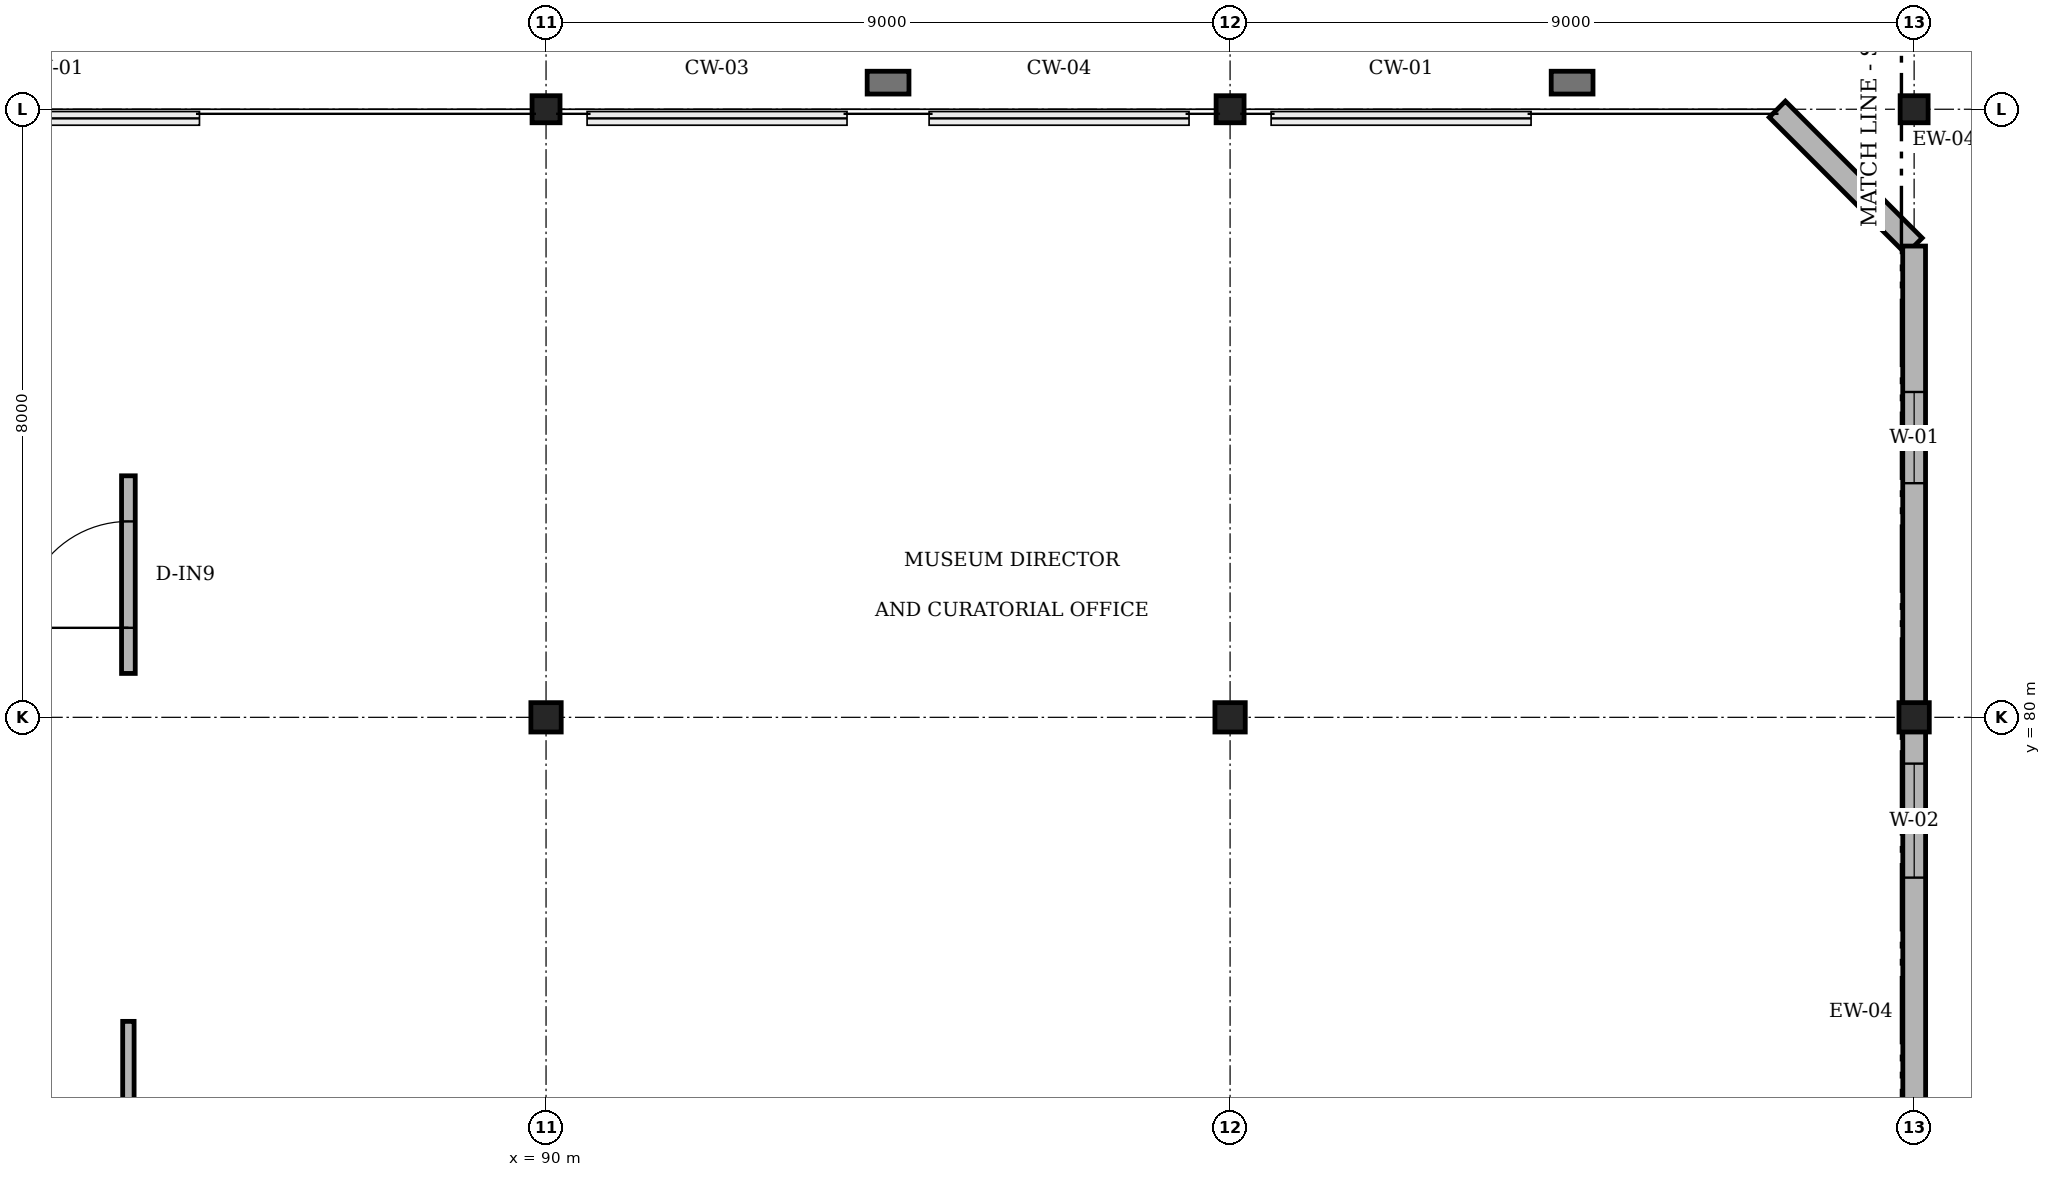
"""IFC4 building model, lengths in metres.
Left out: names, types, materials, properties, quantities, classifications, styles, units other than length and angle.
Written with IfcOpenShell. Run it as: python <this file> out.ifc"""

import sys

from ifc_helpers import new_model, si_unit, direction, frame, frame_2d, origin, origin_2d, place, context, subcontext, project, spatial, rectangle, i_section, extrude, element, fill, save


model = new_model("IFC4")
c1 = context("Model", 3, precision=1e-05, world=origin(), true_north=direction((0.0, 1.0)))
c2 = subcontext(c1, "Body", "Model", "MODEL_VIEW")
j1 = project(units=[si_unit("LENGTHUNIT", "METRE"), si_unit("PLANEANGLEUNIT", "RADIAN")], contexts=[c1])
p1 = place(None, origin())
s1 = spatial("IfcSite", under=j1, at=p1, CompositionType="ELEMENT")
p2 = place(p1, origin())
s2 = spatial("IfcBuilding", under=s1, at=p2, CompositionType="ELEMENT")
p3 = place(p2, frame((0.0, 0.0, 15.6)))
s3 = spatial("IfcBuildingStorey", under=s2, at=p3, CompositionType="ELEMENT", Elevation=15.6)
p4 = place(p3, frame((90.0, 80.0, 0.0), z_axis=(0.0, 0.0, 1.0), x_axis=(1.0, 0.0, 0.0)))
e1 = element("IfcColumn", 1, at=p4, inside=s3, PredefinedType="COLUMN", context=c2, shape_type="SweptSolid", body=[
    extrude(i_section(OverallWidth=0.399, OverallDepth=0.386, WebThickness=0.021, FlangeThickness=0.033, FilletRadius=0.015, at=origin_2d()), origin(), (0.0, 0.0, 1.0), 4.8),
])
p5 = place(p3, frame((90.0, 88.0, 0.0), z_axis=(0.0, 0.0, 1.0), x_axis=(1.0, 0.0, 0.0)))
e2 = element("IfcColumn", 2, at=p5, inside=s3, PredefinedType="COLUMN", context=c2, shape_type="SweptSolid", body=[
    extrude(i_section(OverallWidth=0.368, OverallDepth=0.356, WebThickness=0.011, FlangeThickness=0.018, FilletRadius=0.015, at=origin_2d()), origin(), (0.0, 0.0, 1.0), 4.8),
])
p6 = place(p3, frame((99.0, 80.0, 0.0), z_axis=(0.0, 0.0, 1.0), x_axis=(1.0, 0.0, 0.0)))
e3 = element("IfcColumn", 3, at=p6, inside=s3, PredefinedType="COLUMN", context=c2, shape_type="SweptSolid", body=[
    extrude(i_section(OverallWidth=0.399, OverallDepth=0.386, WebThickness=0.021, FlangeThickness=0.033, FilletRadius=0.015, at=origin_2d()), origin(), (0.0, 0.0, 1.0), 4.8),
])
p7 = place(p3, frame((99.0, 88.0, 0.0), z_axis=(0.0, 0.0, 1.0), x_axis=(1.0, 0.0, 0.0)))
e4 = element("IfcColumn", 4, at=p7, inside=s3, PredefinedType="COLUMN", context=c2, shape_type="SweptSolid", body=[
    extrude(i_section(OverallWidth=0.368, OverallDepth=0.356, WebThickness=0.011, FlangeThickness=0.018, FilletRadius=0.015, at=origin_2d()), origin(), (0.0, 0.0, 1.0), 4.8),
])
p8 = place(p3, frame((108.0, 80.0, 0.0), z_axis=(0.0, 0.0, 1.0), x_axis=(1.0, 0.0, 0.0)))
e5 = element("IfcColumn", 5, at=p8, inside=s3, PredefinedType="COLUMN", context=c2, shape_type="SweptSolid", body=[
    extrude(i_section(OverallWidth=0.399, OverallDepth=0.386, WebThickness=0.021, FlangeThickness=0.033, FilletRadius=0.015, at=origin_2d()), origin(), (0.0, 0.0, 1.0), 4.8),
])
p9 = place(p3, frame((108.0, 88.0, 0.0), z_axis=(0.0, 0.0, 1.0), x_axis=(1.0, 0.0, 0.0)))
e6 = element("IfcColumn", 6, at=p9, inside=s3, PredefinedType="COLUMN", context=c2, shape_type="SweptSolid", body=[
    extrude(i_section(OverallWidth=0.368, OverallDepth=0.356, WebThickness=0.011, FlangeThickness=0.018, FilletRadius=0.015, at=origin_2d()), origin(), (0.0, 0.0, 1.0), 4.8),
])
for number, where, z_axis, x_axis in (
    (7, (94.5, 88.35, 0.0), (0.0, 0.0, 1.0), (1.0, 0.0, 0.0)),
    (8, (103.5, 88.35, 0.0), (0.0, 0.0, 1.0), (1.0, 0.0, 0.0)),
):
    element("IfcColumn", number, at=place(p3, frame(where, z_axis=z_axis, x_axis=x_axis)), inside=s3, PredefinedType="PILASTER", context=c2, shape_type="SweptSolid", body=[
        extrude(rectangle(XDim=0.55, YDim=0.3, at=origin_2d()), origin(), (0.0, 0.0, 1.0), 4.8),
    ])
p10 = place(p3, frame((106.2, 88.0, 0.0), z_axis=(0.0, 0.0, 1.0), x_axis=(0.707106781187, -0.707106781187, 0.0)))
e9 = element("IfcWall", 9, at=p10, inside=s3, PredefinedType="SOLIDWALL", context=c2, shape_type="SweptSolid", body=[
    extrude(rectangle(XDim=2.546, YDim=0.3, at=frame_2d((1.273, 0.0))), origin(), (0.0, 0.0, 1.0), 3.832),
])
p11 = place(p3, frame((108.0, 86.2, 0.0), z_axis=(0.0, 0.0, 1.0), x_axis=(0.000133228364, -0.999999991125, 0.0)))
e10 = element("IfcWall", 10, at=p11, inside=s3, PredefinedType="SOLIDWALL", context=c2, shape_type="SweptSolid", body=[
    extrude(rectangle(XDim=20.157, YDim=0.3, at=frame_2d((10.079, 0.0))), origin(), (0.0, 0.0, 1.0), 3.656),
])
p12 = place(p11, frame((1.92, 0.0, 1.0)))
e11 = element("IfcOpeningElement", 11, at=p12, cuts=e10, PredefinedType="OPENING", context=c2, shape_type="SweptSolid", body=[
    extrude(rectangle(XDim=1.2, YDim=1.8, at=frame_2d((0.6, 0.9))), frame((0.0, 0.16, 0.0), z_axis=(0.0, -1.0, 0.0), x_axis=(1.0, 0.0, 0.0)), (0.0, 0.0, 1.0), 0.32),
])
p13 = place(p11, frame((6.809, 0.0, 1.0)))
e12 = element("IfcOpeningElement", 12, at=p13, cuts=e10, PredefinedType="OPENING", context=c2, shape_type="SweptSolid", body=[
    extrude(rectangle(XDim=1.5, YDim=1.8, at=frame_2d((0.75, 0.9))), frame((0.0, 0.16, 0.0), z_axis=(0.0, -1.0, 0.0), x_axis=(1.0, 0.0, 0.0)), (0.0, 0.0, 1.0), 0.32),
])
p14 = place(p11, frame((11.698, 0.0, 1.0)))
e13 = element("IfcOpeningElement", 13, at=p14, cuts=e10, PredefinedType="OPENING", context=c2, shape_type="SweptSolid", body=[
    extrude(rectangle(XDim=1.8, YDim=1.8, at=frame_2d((0.9, 0.9))), frame((0.0, 0.16, 0.0), z_axis=(0.0, -1.0, 0.0), x_axis=(1.0, 0.0, 0.0)), (0.0, 0.0, 1.0), 0.32),
])
p15 = place(p11, frame((16.588, 0.0, 1.0)))
e14 = element("IfcOpeningElement", 14, at=p15, cuts=e10, PredefinedType="OPENING", context=c2, shape_type="SweptSolid", body=[
    extrude(rectangle(XDim=2.1, YDim=1.8, at=frame_2d((1.05, 0.9))), frame((0.0, 0.16, 0.0), z_axis=(0.0, -1.0, 0.0), x_axis=(1.0, 0.0, 0.0)), (0.0, 0.0, 1.0), 0.32),
])
p16 = place(p3, frame((84.505, 64.0, 0.0), z_axis=(0.0, 0.0, 1.0), x_axis=(0.0, 1.0, 0.0)))
e15 = element("IfcWall", 15, at=p16, inside=s3, PredefinedType="PARTITIONING", context=c2, shape_type="SweptSolid", body=[
    extrude(rectangle(XDim=12.0, YDim=0.15, at=frame_2d((6.0, 0.0))), origin(), (0.0, 0.0, 1.0), 3.15),
])
p17 = place(p16, frame((5.15, 0.0, 0.0)))
e16 = element("IfcOpeningElement", 16, at=p17, cuts=e15, PredefinedType="OPENING", context=c2, shape_type="SweptSolid", body=[
    extrude(rectangle(XDim=1.7, YDim=2.3, at=frame_2d((0.85, 1.15))), frame((0.0, 0.085, 0.0), z_axis=(0.0, -1.0, 0.0), x_axis=(1.0, 0.0, 0.0)), (0.0, 0.0, 1.0), 0.17),
])
p18 = place(p3, frame((84.505, 80.577, 0.0), z_axis=(0.0, 0.0, 1.0), x_axis=(0.0, 1.0, 0.0)))
e17 = element("IfcWall", 17, at=p18, inside=s3, PredefinedType="PARTITIONING", context=c2, shape_type="SweptSolid", body=[
    extrude(rectangle(XDim=2.6, YDim=0.18, at=frame_2d((1.3, 0.0))), origin(), (0.0, 0.0, 1.0), 3.15),
])
p19 = place(p18, frame((0.6, 0.0, 0.0)))
e18 = element("IfcOpeningElement", 18, at=p19, cuts=e17, PredefinedType="OPENING", context=c2, shape_type="SweptSolid", body=[
    extrude(rectangle(XDim=1.4, YDim=2.25, at=frame_2d((0.7, 1.125))), frame((0.0, 0.1, 0.0), z_axis=(0.0, -1.0, 0.0), x_axis=(1.0, 0.0, 0.0)), (0.0, 0.0, 1.0), 0.2),
])
p20 = place(p12, origin())
e19 = element("IfcWindow", 19, at=p20, inside=s3, PartitioningType="SINGLE_PANEL", PredefinedType="WINDOW", context=c2, shape_type="SweptSolid", body=[
    extrude(rectangle(XDim=1.2, YDim=1.8, at=frame_2d((0.6, 0.9))), frame((0.0, 0.03, 0.0), z_axis=(0.0, -1.0, 0.0), x_axis=(1.0, 0.0, 0.0)), (0.0, 0.0, 1.0), 0.06),
])
fill(e11, e19)
p21 = place(p13, origin())
e20 = element("IfcWindow", 20, at=p21, inside=s3, PartitioningType="SINGLE_PANEL", PredefinedType="WINDOW", context=c2, shape_type="SweptSolid", body=[
    extrude(rectangle(XDim=1.5, YDim=1.8, at=frame_2d((0.75, 0.9))), frame((0.0, 0.03, 0.0), z_axis=(0.0, -1.0, 0.0), x_axis=(1.0, 0.0, 0.0)), (0.0, 0.0, 1.0), 0.06),
])
fill(e12, e20)
p22 = place(p19, origin())
e21 = element("IfcDoor", 21, at=p22, inside=s3, OperationType="SINGLE_SWING_LEFT", PredefinedType="DOOR", context=c2, shape_type="SweptSolid", body=[
    extrude(rectangle(XDim=1.4, YDim=2.25, at=frame_2d((0.7, 1.125))), frame((0.0, 0.025, 0.0), z_axis=(0.0, -1.0, 0.0), x_axis=(1.0, 0.0, 0.0)), (0.0, 0.0, 1.0), 0.05),
])
fill(e18, e21)
save(model, sys.argv[1])
